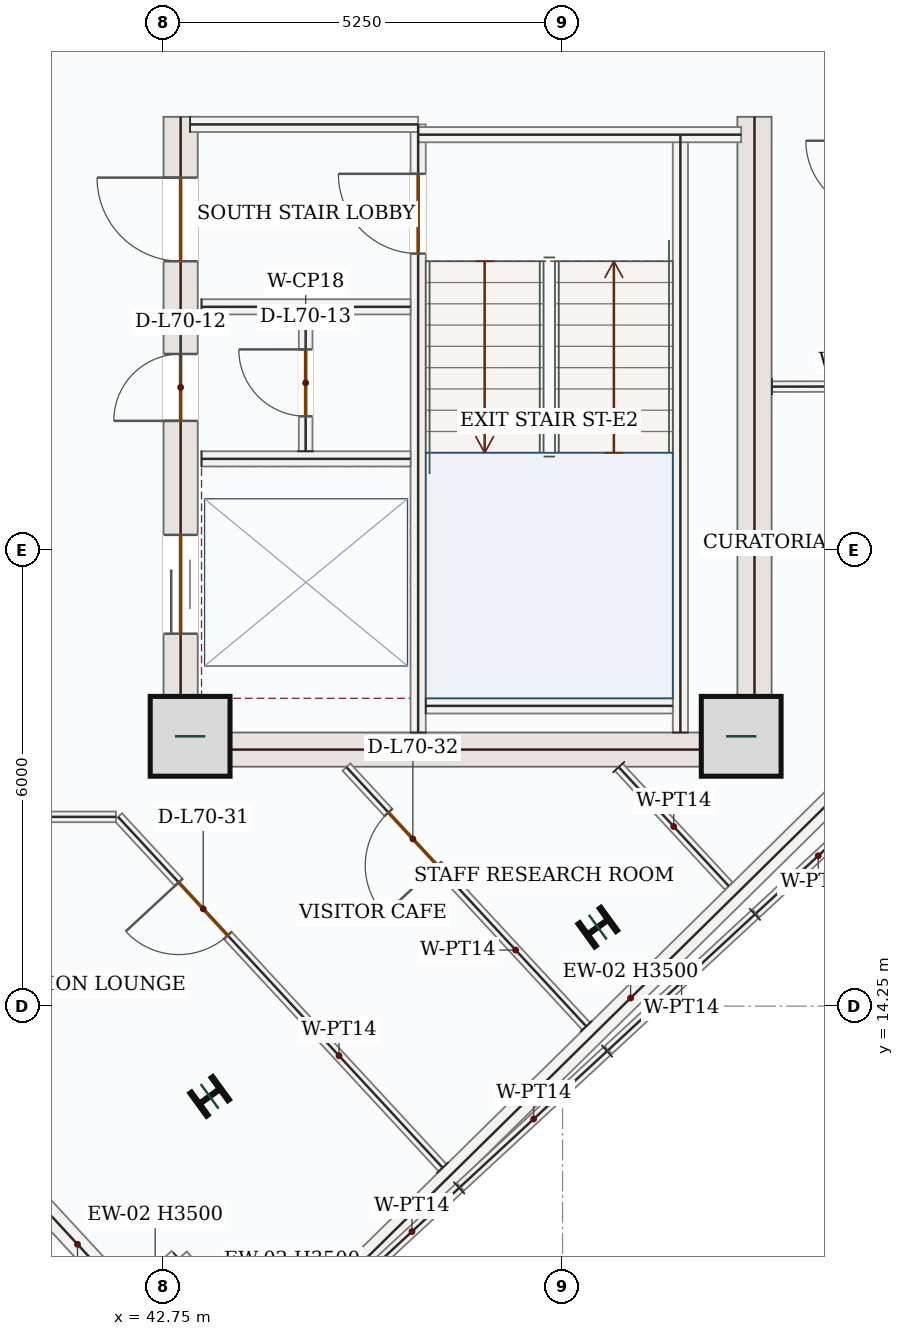
"""IFC4 building model, lengths in metres.
Left out: names, types, materials, properties, quantities, classifications, styles, units other than length and angle.
Written with IfcOpenShell. Run it as: python <this file> out.ifc"""

import sys

from ifc_helpers import new_model, si_unit, direction, frame, frame_2d, origin, origin_2d, place, context, subcontext, project, spatial, rectangle, i_section, extrude, source, transform, mapped, element, fill, save


model = new_model("IFC4")
c1 = context("Model", 3, precision=1e-05, world=origin(), true_north=direction((0.0, 1.0)))
c2 = subcontext(c1, "Body", "Model", "MODEL_VIEW")
j1 = project(units=[si_unit("LENGTHUNIT", "METRE"), si_unit("PLANEANGLEUNIT", "RADIAN")], contexts=[c1])
p1 = place(None, origin())
s1 = spatial("IfcSite", under=j1, at=p1, CompositionType="ELEMENT")
p2 = place(p1, origin())
s2 = spatial("IfcBuilding", under=s1, at=p2, CompositionType="ELEMENT")
p3 = place(p2, frame((0.0, 0.0, 291.6)))
s3 = spatial("IfcBuildingStorey", under=s2, at=p3, CompositionType="ELEMENT", Elevation=291.6)
p4 = place(p3, frame((42.975, 17.4, 0.0), z_axis=(0.0, 0.0, 1.0), x_axis=(0.0, 1.0, 0.0)))
e1 = element("IfcWall", 1, at=p4, inside=s3, PredefinedType="SHEAR", context=c2, shape_type="SweptSolid", body=[
    extrude(rectangle(XDim=8.55, YDim=0.45, at=frame_2d((4.275, 0.0))), origin(), (0.0, 0.0, 1.0), 3.5),
])
p5 = place(p4, frame((6.65, 0.0, 0.0)))
e2 = element("IfcOpeningElement", 2, at=p5, cuts=e1, PredefinedType="OPENING", context=c2, shape_type="SweptSolid", body=[
    extrude(rectangle(XDim=1.1, YDim=2.2, at=frame_2d((0.55, 1.1))), frame((0.0, 0.235, 0.0), z_axis=(0.0, -1.0, 0.0), x_axis=(1.0, 0.0, 0.0)), (0.0, 0.0, 1.0), 0.47),
])
p6 = place(p4, frame((1.75, 0.0, 0.0)))
e3 = element("IfcOpeningElement", 3, at=p6, cuts=e1, PredefinedType="OPENING", context=c2, shape_type="SweptSolid", body=[
    extrude(rectangle(XDim=1.3, YDim=2.2, at=frame_2d((0.65, 1.1))), frame((0.0, 0.235, 0.0), z_axis=(0.0, -1.0, 0.0), x_axis=(1.0, 0.0, 0.0)), (0.0, 0.0, 1.0), 0.47),
])
p7 = place(p4, frame((4.55, 0.0, 0.0)))
e4 = element("IfcOpeningElement", 4, at=p7, cuts=e1, PredefinedType="OPENING", context=c2, shape_type="SweptSolid", body=[
    extrude(rectangle(XDim=0.88, YDim=2.1, at=frame_2d((0.44, 1.05))), frame((0.0, 0.235, 0.0), z_axis=(0.0, -1.0, 0.0), x_axis=(1.0, 0.0, 0.0)), (0.0, 0.0, 1.0), 0.47),
])
m1 = source(origin(), c2, "Body", "SweptSolid", [
    extrude(rectangle(XDim=8.55, YDim=0.45, at=frame_2d((4.275, 0.0))), origin(), (0.0, 0.0, 1.0), 3.5),
])
p8 = place(p3, frame((50.525, 17.4, 0.0), z_axis=(0.0, 0.0, 1.0), x_axis=(0.0, 1.0, 0.0)))
e5 = element("IfcWall", 5, at=p8, inside=s3, PredefinedType="SHEAR", context=c2, shape_type="MappedRepresentation", body=[
    mapped(m1, transform((0.0, 0.0, 0.0), x_axis=(1.0, 0.0, 0.0), y_axis=(0.0, 1.0, 0.0), z_axis=(0.0, 0.0, 1.0), scale=1.0)),
])
m2 = source(origin(), c2, "Body", "SweptSolid", [
    extrude(rectangle(XDim=7.1, YDim=0.45, at=frame_2d((3.55, 0.0))), origin(), (0.0, 0.0, 1.0), 3.5),
])
p9 = place(p3, frame((43.2, 17.625, 0.0), z_axis=(0.0, 0.0, 1.0), x_axis=(1.0, 0.0, 0.0)))
e6 = element("IfcWall", 6, at=p9, inside=s3, PredefinedType="SHEAR", context=c2, shape_type="MappedRepresentation", body=[
    mapped(m2, transform((0.0, 0.0, 0.0), x_axis=(1.0, 0.0, 0.0), y_axis=(0.0, 1.0, 0.0), z_axis=(0.0, 0.0, 1.0), scale=1.0)),
])
m3 = source(origin(), c2, "Body", "SweptSolid", [
    extrude(rectangle(XDim=1.05, YDim=1.05, at=origin_2d()), origin(), (0.0, 0.0, 1.0), 3.75),
])
for number, where, z_axis, x_axis in (
    (7, (43.1, 17.8, 0.0), (0.0, 0.0, 1.0), (1.0, 0.0, 0.0)),
    (8, (50.35, 17.8, 0.0), (0.0, 0.0, 1.0), (1.0, 0.0, 0.0)),
):
    element("IfcColumn", number, at=place(p3, frame(where, z_axis=z_axis, x_axis=x_axis)), inside=s3, PredefinedType="COLUMN", context=c2, shape_type="MappedRepresentation", body=[
        mapped(m3, transform((0.0, 0.0, 0.0), x_axis=(1.0, 0.0, 0.0), y_axis=(0.0, 1.0, 0.0), z_axis=(0.0, 0.0, 1.0), scale=1.0)),
    ])
m4 = source(origin(), c2, "Body", "SweptSolid", [
    extrude(i_section(OverallWidth=0.374, OverallDepth=0.372, WebThickness=0.016, FlangeThickness=0.026, FilletRadius=0.018, at=origin_2d()), origin(), (0.0, 0.0, 1.0), 3.75),
])
for number, where, z_axis, x_axis in (
    (9, (43.357, 13.063, 0.0), (0.0, 0.0, 1.0), (-0.588, 0.809, 0.0)),
    (10, (48.464, 15.289, 0.0), (0.0, 0.0, 1.0), (-0.588, 0.809, 0.0)),
):
    element("IfcColumn", number, at=place(p3, frame(where, z_axis=z_axis, x_axis=x_axis)), inside=s3, PredefinedType="COLUMN", context=c2, shape_type="MappedRepresentation", body=[
        mapped(m4, transform((0.0, 0.0, 0.0), x_axis=(1.0, 0.0, 0.0), y_axis=(0.0, 1.0, 0.0), z_axis=(0.0, 0.0, 1.0), scale=1.0)),
    ])
m5 = source(origin(), c2, "Body", "SweptSolid", [
    extrude(rectangle(XDim=11.69, YDim=0.28, at=frame_2d((5.845, 0.0))), origin(), (0.0, 0.0, 1.0), 3.5),
])
p10 = place(p3, frame((53.06, 18.458, 0.0), z_axis=(0.0, 0.0, 1.0), x_axis=(-0.712557502542, -0.701613715353, 0.0)))
e11 = element("IfcWall", 11, at=p10, inside=s3, PredefinedType="SOLIDWALL", context=c2, shape_type="MappedRepresentation", body=[
    mapped(m5, transform((0.0, 0.0, 0.0), x_axis=(1.0, 0.0, 0.0), y_axis=(0.0, 1.0, 0.0), z_axis=(0.0, 0.0, 1.0), scale=1.0)),
])
m6 = source(origin(), c2, "Body", "SweptSolid", [
    extrude(rectangle(XDim=0.85, YDim=0.28, at=frame_2d((0.425, 0.0))), origin(), (0.0, 0.0, 1.0), 3.5),
])
for number, where, z_axis, x_axis in (
    (12, (44.73, 10.256, 0.0), (0.0, 0.0, 1.0), (-0.679, 0.734, 0.0)),
    (13, (44.153, 10.88, 0.0), (0.0, 0.0, 1.0), (-0.734, -0.679, 0.0)),
    (14, (43.529, 10.303, 0.0), (0.0, 0.0, 1.0), (-0.679, 0.734, 0.0)),
):
    element("IfcWall", number, at=place(p3, frame(where, z_axis=z_axis, x_axis=x_axis)), inside=s3, PredefinedType="SOLIDWALL", context=c2, shape_type="MappedRepresentation", body=[
        mapped(m6, transform((0.0, 0.0, 0.0), x_axis=(1.0, 0.0, 0.0), y_axis=(0.0, 1.0, 0.0), z_axis=(0.0, 0.0, 1.0), scale=1.0)),
    ])
m7 = source(origin(), c2, "Body", "SweptSolid", [
    extrude(rectangle(XDim=0.85, YDim=0.28, at=frame_2d((0.425, 0.0))), origin(), (0.0, 0.0, 1.0), 3.5),
])
p11 = place(p3, frame((42.952, 10.927, 0.0), z_axis=(0.0, 0.0, 1.0), x_axis=(-0.73428557742, -0.678840696183, 0.0)))
e15 = element("IfcWall", 15, at=p11, inside=s3, PredefinedType="SOLIDWALL", context=c2, shape_type="MappedRepresentation", body=[
    mapped(m7, transform((0.0, 0.0, 0.0), x_axis=(1.0, 0.0, 0.0), y_axis=(0.0, 1.0, 0.0), z_axis=(0.0, 0.0, 1.0), scale=1.0)),
])
p12 = place(p3, frame((42.328, 10.35, 0.0), z_axis=(0.0, 0.0, 1.0), x_axis=(-0.679010627727, 0.734128440693, 0.0)))
e16 = element("IfcWall", 16, at=p12, inside=s3, PredefinedType="SOLIDWALL", context=c2, shape_type="SweptSolid", body=[
    extrude(rectangle(XDim=5.98, YDim=0.28, at=frame_2d((2.99, 0.0))), origin(), (0.0, 0.0, 1.0), 3.5),
])
p13 = place(p12, frame((2.24, 0.0, 0.85)))
e17 = element("IfcOpeningElement", 17, at=p13, cuts=e16, PredefinedType="OPENING", context=c2, shape_type="SweptSolid", body=[
    extrude(rectangle(XDim=1.5, YDim=1.5, at=frame_2d((0.75, 0.75))), frame((0.0, 0.15, 0.0), z_axis=(0.0, -1.0, 0.0), x_axis=(1.0, 0.0, 0.0)), (0.0, 0.0, 1.0), 0.3),
])
m8 = source(origin(), c2, "Body", "SweptSolid", [
    extrude(rectangle(XDim=7.87, YDim=0.2, at=frame_2d((3.935, 0.0))), origin(), (0.0, 0.0, 1.0), 3.5),
])
p14 = place(p3, frame((49.55, 17.85, 0.0), z_axis=(0.0, 0.0, 1.0), x_axis=(0.0, 1.0, 0.0)))
e18 = element("IfcWall", 18, at=p14, inside=s3, PredefinedType="SOLIDWALL", context=c2, shape_type="MappedRepresentation", body=[
    mapped(m8, transform((0.0, 0.0, 0.0), x_axis=(1.0, 0.0, 0.0), y_axis=(0.0, 1.0, 0.0), z_axis=(0.0, 0.0, 1.0), scale=1.0)),
])
p15 = place(p3, frame((46.1, 17.85, 0.0), z_axis=(0.0, 0.0, 1.0), x_axis=(0.0, 1.0, 0.0)))
e19 = element("IfcWall", 19, at=p15, inside=s3, PredefinedType="SOLIDWALL", context=c2, shape_type="SweptSolid", body=[
    extrude(rectangle(XDim=8.0, YDim=0.2, at=frame_2d((4.0, 0.0))), origin(), (0.0, 0.0, 1.0), 3.5),
])
p16 = place(p15, frame((6.3, 0.0, 0.0)))
e20 = element("IfcOpeningElement", 20, at=p16, cuts=e19, PredefinedType="OPENING", context=c2, shape_type="SweptSolid", body=[
    extrude(rectangle(XDim=1.05, YDim=2.15, at=frame_2d((0.525, 1.075))), frame((0.0, 0.11, 0.0), z_axis=(0.0, -1.0, 0.0), x_axis=(1.0, 0.0, 0.0)), (0.0, 0.0, 1.0), 0.22),
])
m9 = source(origin(), c2, "Body", "SweptSolid", [
    extrude(rectangle(XDim=3.0, YDim=0.2, at=frame_2d((1.5, 0.0))), origin(), (0.0, 0.0, 1.0), 3.5),
])
p17 = place(p3, frame((43.1, 25.85, 0.0), z_axis=(0.0, 0.0, 1.0), x_axis=(1.0, 0.0, 0.0)))
e21 = element("IfcWall", 21, at=p17, inside=s3, PredefinedType="SOLIDWALL", context=c2, shape_type="MappedRepresentation", body=[
    mapped(m9, transform((0.0, 0.0, 0.0), x_axis=(1.0, 0.0, 0.0), y_axis=(0.0, 1.0, 0.0), z_axis=(0.0, 0.0, 1.0), scale=1.0)),
])
m10 = source(origin(), c2, "Body", "SweptSolid", [
    extrude(rectangle(XDim=4.25, YDim=0.2, at=frame_2d((2.125, 0.0))), origin(), (0.0, 0.0, 1.0), 3.5),
])
p18 = place(p3, frame((46.1, 25.715, 0.0), z_axis=(0.0, 0.0, 1.0), x_axis=(1.0, 0.0, 0.0)))
e22 = element("IfcWall", 22, at=p18, inside=s3, PredefinedType="SOLIDWALL", context=c2, shape_type="MappedRepresentation", body=[
    mapped(m10, transform((0.0, 0.0, 0.0), x_axis=(1.0, 0.0, 0.0), y_axis=(0.0, 1.0, 0.0), z_axis=(0.0, 0.0, 1.0), scale=1.0)),
])
m11 = source(origin(), c2, "Body", "SweptSolid", [
    extrude(rectangle(XDim=3.25, YDim=0.2, at=frame_2d((1.625, 0.0))), origin(), (0.0, 0.0, 1.0), 3.5),
])
p19 = place(p3, frame((46.2, 18.2, 0.0), z_axis=(0.0, 0.0, 1.0), x_axis=(1.0, 0.0, 0.0)))
e23 = element("IfcWall", 23, at=p19, inside=s3, PredefinedType="SOLIDWALL", context=c2, shape_type="MappedRepresentation", body=[
    mapped(m11, transform((0.0, 0.0, 0.0), x_axis=(1.0, 0.0, 0.0), y_axis=(0.0, 1.0, 0.0), z_axis=(0.0, 0.0, 1.0), scale=1.0)),
])
m12 = source(origin(), c2, "Body", "SweptSolid", [
    extrude(rectangle(XDim=2.75, YDim=0.2, at=frame_2d((1.375, 0.0))), origin(), (0.0, 0.0, 1.0), 3.5),
])
for number, where, z_axis, x_axis in (
    (24, (43.25, 23.45, 0.0), (0.0, 0.0, 1.0), (1.0, 0.0, 0.0)),
    (25, (43.25, 21.45, 0.0), (0.0, 0.0, 1.0), (1.0, 0.0, 0.0)),
):
    element("IfcWall", number, at=place(p3, frame(where, z_axis=z_axis, x_axis=x_axis)), inside=s3, PredefinedType="SOLIDWALL", context=c2, shape_type="MappedRepresentation", body=[
        mapped(m12, transform((0.0, 0.0, 0.0), x_axis=(1.0, 0.0, 0.0), y_axis=(0.0, 1.0, 0.0), z_axis=(0.0, 0.0, 1.0), scale=1.0)),
    ])
p20 = place(p3, frame((44.62, 21.55, 0.0), z_axis=(0.0, 0.0, 1.0), x_axis=(0.0, 1.0, 0.0)))
e26 = element("IfcWall", 26, at=p20, inside=s3, PredefinedType="PARTITIONING", context=c2, shape_type="SweptSolid", body=[
    extrude(rectangle(XDim=1.8, YDim=0.18, at=frame_2d((0.9, 0.0))), origin(), (0.0, 0.0, 1.0), 3.5),
])
p21 = place(p20, frame((0.46, 0.0, 0.0)))
e27 = element("IfcOpeningElement", 27, at=p21, cuts=e26, PredefinedType="OPENING", context=c2, shape_type="SweptSolid", body=[
    extrude(rectangle(XDim=0.88, YDim=2.1, at=frame_2d((0.44, 1.05))), frame((0.0, 0.1, 0.0), z_axis=(0.0, -1.0, 0.0), x_axis=(1.0, 0.0, 0.0)), (0.0, 0.0, 1.0), 0.2),
])
p22 = place(p3, frame((48.311, 13.985, 0.0), z_axis=(0.0, 0.0, 1.0), x_axis=(-0.679002327249, 0.73413611789, 0.0)))
e28 = element("IfcWall", 28, at=p22, inside=s3, PredefinedType="PARTITIONING", context=c2, shape_type="SweptSolid", body=[
    extrude(rectangle(XDim=4.645, YDim=0.14, at=frame_2d((2.323, 0.0))), origin(), (0.0, 0.0, 1.0), 3.5),
])
p23 = place(p22, frame((2.882, 0.0, 0.0)))
e29 = element("IfcOpeningElement", 29, at=p23, cuts=e28, PredefinedType="OPENING", context=c2, shape_type="SweptSolid", body=[
    extrude(rectangle(XDim=0.95, YDim=2.15, at=frame_2d((0.475, 1.075))), frame((0.0, 0.08, 0.0), z_axis=(0.0, -1.0, 0.0), x_axis=(1.0, 0.0, 0.0)), (0.0, 0.0, 1.0), 0.16),
])
m13 = source(origin(), c2, "Body", "SweptSolid", [
    extrude(rectangle(XDim=2.13, YDim=0.14, at=frame_2d((1.065, 0.0))), origin(), (0.0, 0.0, 1.0), 3.5),
])
p24 = place(p3, frame((48.739, 17.395, 0.0), z_axis=(0.0, 0.0, 1.0), x_axis=(0.678946242809, -0.734187986401, 0.0)))
e30 = element("IfcWall", 30, at=p24, inside=s3, PredefinedType="PARTITIONING", context=c2, shape_type="MappedRepresentation", body=[
    mapped(m13, transform((0.0, 0.0, 0.0), x_axis=(1.0, 0.0, 0.0), y_axis=(0.0, 1.0, 0.0), z_axis=(0.0, 0.0, 1.0), scale=1.0)),
])
m14 = source(origin(), c2, "Body", "SweptSolid", [
    extrude(rectangle(XDim=2.63, YDim=0.14, at=frame_2d((1.315, 0.0))), origin(), (0.0, 0.0, 1.0), 3.5),
])
for number, where, z_axis, x_axis in (
    (31, (50.531, 15.458, 0.0), (0.0, 0.0, 1.0), (-0.734, -0.679, 0.0)),
    (32, (48.585, 13.658, 0.0), (0.0, 0.0, 1.0), (-0.734, -0.679, 0.0)),
):
    element("IfcWall", number, at=place(p3, frame(where, z_axis=z_axis, x_axis=x_axis)), inside=s3, PredefinedType="PARTITIONING", context=c2, shape_type="MappedRepresentation", body=[
        mapped(m14, transform((0.0, 0.0, 0.0), x_axis=(1.0, 0.0, 0.0), y_axis=(0.0, 1.0, 0.0), z_axis=(0.0, 0.0, 1.0), scale=1.0)),
    ])
p25 = place(p3, frame((46.421, 12.125, 0.0), z_axis=(0.0, 0.0, 1.0), x_axis=(-0.679016867794, 0.734122669076, 0.0)))
e33 = element("IfcWall", 33, at=p25, inside=s3, PredefinedType="PARTITIONING", context=c2, shape_type="SweptSolid", body=[
    extrude(rectangle(XDim=6.287, YDim=0.14, at=frame_2d((3.143, 0.0))), origin(), (0.0, 0.0, 1.0), 3.5),
])
p26 = place(p25, frame((4.163, 0.0, 0.0)))
e34 = element("IfcOpeningElement", 34, at=p26, cuts=e33, PredefinedType="OPENING", context=c2, shape_type="SweptSolid", body=[
    extrude(rectangle(XDim=0.95, YDim=2.15, at=frame_2d((0.475, 1.075))), frame((0.0, 0.08, 0.0), z_axis=(0.0, -1.0, 0.0), x_axis=(1.0, 0.0, 0.0)), (0.0, 0.0, 1.0), 0.16),
])
m15 = source(origin(), c2, "Body", "SweptSolid", [
    extrude(rectangle(XDim=2.223, YDim=0.14, at=frame_2d((1.111, 0.0))), origin(), (0.0, 0.0, 1.0), 3.5),
])
p27 = place(p3, frame((50.755, 22.4, 0.0), z_axis=(0.0, 0.0, 1.0), x_axis=(0.99999881761, 0.00153778377, 0.0)))
e35 = element("IfcWall", 35, at=p27, inside=s3, PredefinedType="PARTITIONING", context=c2, shape_type="MappedRepresentation", body=[
    mapped(m15, transform((0.0, 0.0, 0.0), x_axis=(1.0, 0.0, 0.0), y_axis=(0.0, 1.0, 0.0), z_axis=(0.0, 0.0, 1.0), scale=1.0)),
])
m16 = source(origin(), c2, "Body", "SweptSolid", [
    extrude(rectangle(XDim=2.229, YDim=0.14, at=frame_2d((1.115, 0.0))), origin(), (0.0, 0.0, 1.0), 3.5),
])
p28 = place(p3, frame((52.182, 16.985, 0.0), z_axis=(0.0, 0.0, 1.0), x_axis=(-0.734110356631, -0.679030179217, 0.0)))
e36 = element("IfcWall", 36, at=p28, inside=s3, PredefinedType="PARTITIONING", context=c2, shape_type="MappedRepresentation", body=[
    mapped(m16, transform((0.0, 0.0, 0.0), x_axis=(1.0, 0.0, 0.0), y_axis=(0.0, 1.0, 0.0), z_axis=(0.0, 0.0, 1.0), scale=1.0)),
])
p29 = place(p3, frame((35.61, 16.74, 0.0), z_axis=(0.0, 0.0, 1.0), x_axis=(1.0, 0.0, 0.0)))
e37 = element("IfcWall", 37, at=p29, inside=s3, PredefinedType="PARTITIONING", context=c2, shape_type="SweptSolid", body=[
    extrude(rectangle(XDim=6.515, YDim=0.14, at=frame_2d((3.258, 0.0))), origin(), (0.0, 0.0, 1.0), 3.5),
])
p30 = place(p29, frame((1.224, 0.0, 0.0)))
e38 = element("IfcOpeningElement", 38, at=p30, cuts=e37, PredefinedType="OPENING", context=c2, shape_type="SweptSolid", body=[
    extrude(rectangle(XDim=0.95, YDim=2.15, at=frame_2d((0.475, 1.075))), frame((0.0, 0.08, 0.0), z_axis=(0.0, -1.0, 0.0), x_axis=(1.0, 0.0, 0.0)), (0.0, 0.0, 1.0), 0.16),
])
m17 = source(origin(), c2, "Body", "SweptSolid", [
    extrude(rectangle(XDim=1.692, YDim=0.14, at=frame_2d((0.846, 0.0))), origin(), (0.0, 0.0, 1.0), 3.5),
])
p31 = place(p3, frame((46.64, 11.859, 0.0), z_axis=(0.0, 0.0, 1.0), x_axis=(-0.734194722112, -0.678938958982, 0.0)))
e39 = element("IfcWall", 39, at=p31, inside=s3, PredefinedType="PARTITIONING", context=c2, shape_type="MappedRepresentation", body=[
    mapped(m17, transform((0.0, 0.0, 0.0), x_axis=(1.0, 0.0, 0.0), y_axis=(0.0, 1.0, 0.0), z_axis=(0.0, 0.0, 1.0), scale=1.0)),
])
m18 = source(origin(), c2, "Body", "SweptSolid", [
    extrude(rectangle(XDim=1.05, YDim=2.15, at=frame_2d((0.525, 1.075))), frame((0.0, 0.025, 0.0), z_axis=(0.0, -1.0, 0.0), x_axis=(1.0, 0.0, 0.0)), (0.0, 0.0, 1.0), 0.05),
])
p32 = place(p16, origin())
e40 = element("IfcDoor", 40, at=p32, inside=s3, OperationType="SINGLE_SWING_RIGHT", PredefinedType="DOOR", context=c2, shape_type="MappedRepresentation", body=[
    mapped(m18, transform((0.0, 0.0, 0.0), x_axis=(1.0, 0.0, 0.0), y_axis=(0.0, 1.0, 0.0), z_axis=(0.0, 0.0, 1.0), scale=1.0)),
])
fill(e20, e40)
m19 = source(origin(), c2, "Body", "SweptSolid", [
    extrude(rectangle(XDim=1.1, YDim=2.2, at=frame_2d((0.55, 1.1))), frame((0.0, 0.025, 0.0), z_axis=(0.0, -1.0, 0.0), x_axis=(1.0, 0.0, 0.0)), (0.0, 0.0, 1.0), 0.05),
])
p33 = place(p5, origin())
e41 = element("IfcDoor", 41, at=p33, inside=s3, OperationType="SINGLE_SWING_RIGHT", PredefinedType="DOOR", context=c2, shape_type="MappedRepresentation", body=[
    mapped(m19, transform((0.0, 0.0, 0.0), x_axis=(1.0, 0.0, 0.0), y_axis=(0.0, 1.0, 0.0), z_axis=(0.0, 0.0, 1.0), scale=1.0)),
])
fill(e2, e41)
m20 = source(origin(), c2, "Body", "SweptSolid", [
    extrude(rectangle(XDim=1.3, YDim=2.2, at=frame_2d((0.65, 1.1))), frame((0.0, 0.025, 0.0), z_axis=(0.0, -1.0, 0.0), x_axis=(1.0, 0.0, 0.0)), (0.0, 0.0, 1.0), 0.05),
])
p34 = place(p6, origin())
e42 = element("IfcDoor", 42, at=p34, inside=s3, OperationType="DOUBLE_DOOR_SLIDING", PredefinedType="DOOR", context=c2, shape_type="MappedRepresentation", body=[
    mapped(m20, transform((0.0, 0.0, 0.0), x_axis=(1.0, 0.0, 0.0), y_axis=(0.0, 1.0, 0.0), z_axis=(0.0, 0.0, 1.0), scale=1.0)),
])
fill(e3, e42)
m21 = source(origin(), c2, "Body", "SweptSolid", [
    extrude(rectangle(XDim=0.88, YDim=2.1, at=frame_2d((0.44, 1.05))), frame((0.0, 0.025, 0.0), z_axis=(0.0, -1.0, 0.0), x_axis=(1.0, 0.0, 0.0)), (0.0, 0.0, 1.0), 0.05),
])
p35 = place(p7, origin())
e43 = element("IfcDoor", 43, at=p35, inside=s3, OperationType="SINGLE_SWING_LEFT", PredefinedType="DOOR", context=c2, shape_type="MappedRepresentation", body=[
    mapped(m21, transform((0.0, 0.0, 0.0), x_axis=(1.0, 0.0, 0.0), y_axis=(0.0, 1.0, 0.0), z_axis=(0.0, 0.0, 1.0), scale=1.0)),
])
fill(e4, e43)
p36 = place(p21, origin())
e44 = element("IfcDoor", 44, at=p36, inside=s3, OperationType="SINGLE_SWING_RIGHT", PredefinedType="DOOR", context=c2, shape_type="MappedRepresentation", body=[
    mapped(m21, transform((0.0, 0.0, 0.0), x_axis=(1.0, 0.0, 0.0), y_axis=(0.0, 1.0, 0.0), z_axis=(0.0, 0.0, 1.0), scale=1.0)),
])
fill(e27, e44)
m22 = source(origin(), c2, "Body", "SweptSolid", [
    extrude(rectangle(XDim=0.95, YDim=2.15, at=frame_2d((0.475, 1.075))), frame((0.0, 0.025, 0.0), z_axis=(0.0, -1.0, 0.0), x_axis=(1.0, 0.0, 0.0)), (0.0, 0.0, 1.0), 0.05),
])
p37 = place(p26, origin())
e45 = element("IfcDoor", 45, at=p37, inside=s3, OperationType="SINGLE_SWING_RIGHT", PredefinedType="DOOR", context=c2, shape_type="MappedRepresentation", body=[
    mapped(m22, transform((0.0, 0.0, 0.0), x_axis=(1.0, 0.0, 0.0), y_axis=(0.0, 1.0, 0.0), z_axis=(0.0, 0.0, 1.0), scale=1.0)),
])
fill(e34, e45)
p38 = place(p23, origin())
e46 = element("IfcDoor", 46, at=p38, inside=s3, OperationType="SINGLE_SWING_LEFT", PredefinedType="DOOR", context=c2, shape_type="MappedRepresentation", body=[
    mapped(m22, transform((0.0, 0.0, 0.0), x_axis=(1.0, 0.0, 0.0), y_axis=(0.0, 1.0, 0.0), z_axis=(0.0, 0.0, 1.0), scale=1.0)),
])
fill(e29, e46)
save(model, sys.argv[1])
